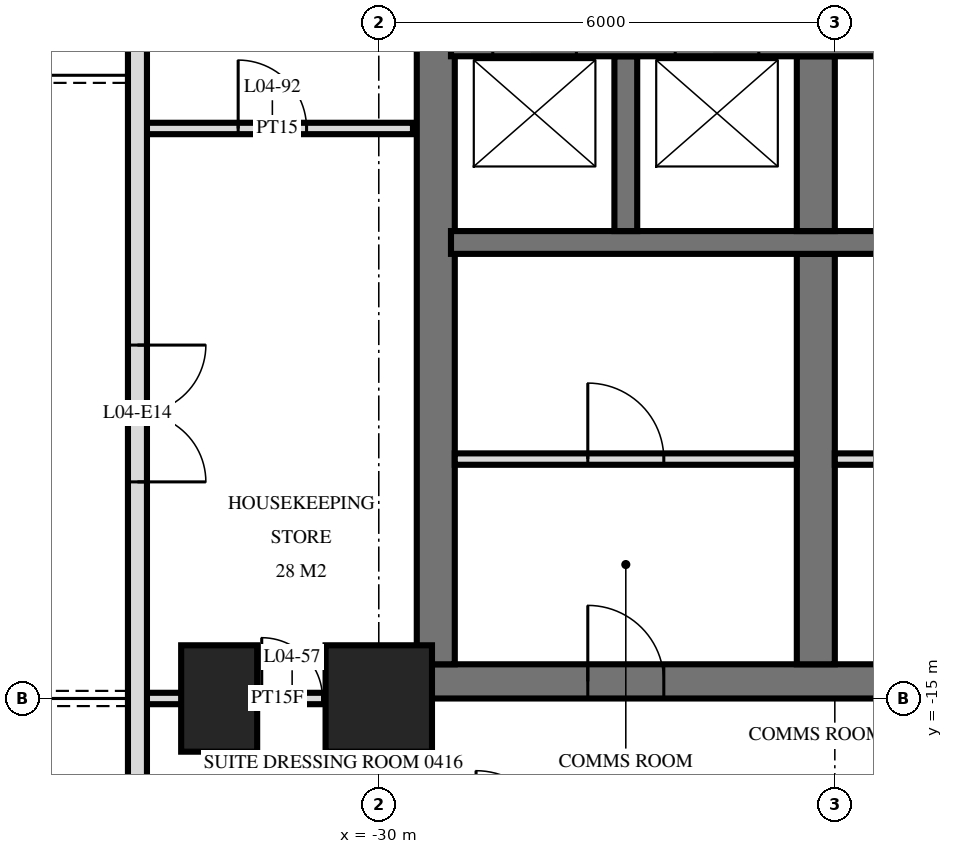
"""IFC4 building model, lengths in metres.
Left out: names, types, materials, properties, quantities, classifications, styles, units other than length and angle.
Written with IfcOpenShell. Run it as: python <this file> out.ifc"""

import sys

from ifc_helpers import new_model, si_unit, direction, frame, frame_2d, origin, origin_2d, place, context, subcontext, project, spatial, rectangle, extrude, element, fill, save


model = new_model("IFC4")
c1 = context("Model", 3, precision=1e-05, world=origin(), true_north=direction((0.0, 1.0)))
c2 = subcontext(c1, "Body", "Model", "MODEL_VIEW")
j1 = project(units=[si_unit("LENGTHUNIT", "METRE"), si_unit("PLANEANGLEUNIT", "RADIAN")], contexts=[c1])
p1 = place(None, origin())
s1 = spatial("IfcSite", under=j1, at=p1, CompositionType="ELEMENT")
p2 = place(p1, origin())
s2 = spatial("IfcBuilding", under=s1, at=p2, CompositionType="ELEMENT")
p3 = place(p2, frame((0.0, 0.0, 24.0)))
s3 = spatial("IfcBuildingStorey", under=s2, at=p3, CompositionType="ELEMENT", Elevation=24.0)
p4 = place(p3, frame((-32.1, -15.0, -0.28), z_axis=(0.0, 0.0, 1.0), x_axis=(0.0, 1.0, 0.0)))
e1 = element("IfcColumn", 1, at=p4, inside=s3, PredefinedType="COLUMN", context=c2, shape_type="SweptSolid", body=[
    extrude(rectangle(XDim=1.4, YDim=1.0, at=origin_2d()), origin(), (0.0, 0.0, 1.0), 3.88),
])
p5 = place(p3, frame((-30.0, -15.0, -0.28), z_axis=(0.0, 0.0, 1.0), x_axis=(1.0, 0.0, 0.0)))
e2 = element("IfcColumn", 2, at=p5, inside=s3, PredefinedType="COLUMN", context=c2, shape_type="SweptSolid", body=[
    extrude(rectangle(XDim=1.4, YDim=1.4, at=origin_2d()), origin(), (0.0, 0.0, 1.0), 3.88),
])
p6 = place(p3, frame((-29.5, -14.775, 0.0), z_axis=(0.0, 0.0, 1.0), x_axis=(1.0, 0.0, 0.0)))
e3 = element("IfcWall", 3, at=p6, inside=s3, PredefinedType="SHEAR", context=c2, shape_type="SweptSolid", body=[
    extrude(rectangle(XDim=19.5, YDim=0.45, at=frame_2d((9.75, 0.0))), origin(), (0.0, 0.0, 1.0), 3.6),
])
p7 = place(p6, frame((11.2, 0.0, 0.0)))
e4 = element("IfcOpeningElement", 4, at=p7, cuts=e3, PredefinedType="OPENING", context=c2, shape_type="SweptSolid", body=[
    extrude(rectangle(XDim=1.2, YDim=2.1, at=frame_2d((0.6, 1.05))), frame((0.0, 0.235, 0.0), z_axis=(0.0, -1.0, 0.0), x_axis=(1.0, 0.0, 0.0)), (0.0, 0.0, 1.0), 0.47),
])
p8 = place(p6, frame((14.25, 0.0, 0.0)))
e5 = element("IfcOpeningElement", 5, at=p8, cuts=e3, PredefinedType="OPENING", context=c2, shape_type="SweptSolid", body=[
    extrude(rectangle(XDim=1.1, YDim=2.1, at=frame_2d((0.55, 1.05))), frame((0.0, 0.235, 0.0), z_axis=(0.0, -1.0, 0.0), x_axis=(1.0, 0.0, 0.0)), (0.0, 0.0, 1.0), 0.47),
])
p9 = place(p6, frame((8.5, 0.0, 0.0)))
e6 = element("IfcOpeningElement", 6, at=p9, cuts=e3, PredefinedType="OPENING", context=c2, shape_type="SweptSolid", body=[
    extrude(rectangle(XDim=0.9, YDim=2.1, at=frame_2d((0.45, 1.05))), frame((0.0, 0.235, 0.0), z_axis=(0.0, -1.0, 0.0), x_axis=(1.0, 0.0, 0.0)), (0.0, 0.0, 1.0), 0.47),
])
p10 = place(p6, frame((6.05, 0.0, 0.0)))
e7 = element("IfcOpeningElement", 7, at=p10, cuts=e3, PredefinedType="OPENING", context=c2, shape_type="SweptSolid", body=[
    extrude(rectangle(XDim=1.0, YDim=2.1, at=frame_2d((0.5, 1.05))), frame((0.0, 0.235, 0.0), z_axis=(0.0, -1.0, 0.0), x_axis=(1.0, 0.0, 0.0)), (0.0, 0.0, 1.0), 0.47),
])
p11 = place(p6, frame((2.25, 0.0, 0.0)))
e8 = element("IfcOpeningElement", 8, at=p11, cuts=e3, PredefinedType="OPENING", context=c2, shape_type="SweptSolid", body=[
    extrude(rectangle(XDim=1.0, YDim=2.1, at=frame_2d((0.5, 1.05))), frame((0.0, 0.235, 0.0), z_axis=(0.0, -1.0, 0.0), x_axis=(1.0, 0.0, 0.0)), (0.0, 0.0, 1.0), 0.47),
])
p12 = place(p3, frame((-29.25, -14.55, 0.0), z_axis=(0.0, 0.0, 1.0), x_axis=(0.0, 1.0, 0.0)))
e9 = element("IfcWall", 9, at=p12, inside=s3, PredefinedType="SHEAR", context=c2, shape_type="SweptSolid", body=[
    extrude(rectangle(XDim=14.1, YDim=0.5, at=frame_2d((7.05, 0.0))), origin(), (0.0, 0.0, 1.0), 3.6),
])
p13 = place(p3, frame((-29.05, -6.4, 0.0), z_axis=(0.0, 0.0, 1.0), x_axis=(1.0, 0.0, 0.0)))
e10 = element("IfcWall", 10, at=p13, inside=s3, PredefinedType="SHEAR", context=c2, shape_type="SweptSolid", body=[
    extrude(rectangle(XDim=18.7, YDim=0.3, at=frame_2d((9.35, 0.0))), origin(), (0.0, 0.0, 1.0), 3.6),
])
p14 = place(p13, frame((2.95, 0.0, 0.0)))
e11 = element("IfcOpeningElement", 11, at=p14, cuts=e10, PredefinedType="OPENING", context=c2, shape_type="SweptSolid", body=[
    extrude(rectangle(XDim=1.1, YDim=2.1, at=frame_2d((0.55, 1.05))), frame((0.0, 0.16, 0.0), z_axis=(0.0, -1.0, 0.0), x_axis=(1.0, 0.0, 0.0)), (0.0, 0.0, 1.0), 0.32),
])
p15 = place(p13, frame((0.55, 0.0, 0.0)))
e12 = element("IfcOpeningElement", 12, at=p15, cuts=e10, PredefinedType="OPENING", context=c2, shape_type="SweptSolid", body=[
    extrude(rectangle(XDim=1.1, YDim=2.1, at=frame_2d((0.55, 1.05))), frame((0.0, 0.16, 0.0), z_axis=(0.0, -1.0, 0.0), x_axis=(1.0, 0.0, 0.0)), (0.0, 0.0, 1.0), 0.32),
])
p16 = place(p13, frame((10.8, 0.0, 0.0)))
e13 = element("IfcOpeningElement", 13, at=p16, cuts=e10, PredefinedType="OPENING", context=c2, shape_type="SweptSolid", body=[
    extrude(rectangle(XDim=1.1, YDim=2.1, at=frame_2d((0.55, 1.05))), frame((0.0, 0.16, 0.0), z_axis=(0.0, -1.0, 0.0), x_axis=(1.0, 0.0, 0.0)), (0.0, 0.0, 1.0), 0.32),
])
p17 = place(p13, frame((5.6, 0.0, 0.0)))
e14 = element("IfcOpeningElement", 14, at=p17, cuts=e10, PredefinedType="OPENING", context=c2, shape_type="SweptSolid", body=[
    extrude(rectangle(XDim=1.0, YDim=2.1, at=frame_2d((0.5, 1.05))), frame((0.0, 0.16, 0.0), z_axis=(0.0, -1.0, 0.0), x_axis=(1.0, 0.0, 0.0)), (0.0, 0.0, 1.0), 0.32),
])
p18 = place(p3, frame((-29.05, -9.0, 0.0), z_axis=(0.0, 0.0, 1.0), x_axis=(1.0, 0.0, 0.0)))
e15 = element("IfcWall", 15, at=p18, inside=s3, PredefinedType="SHEAR", context=c2, shape_type="SweptSolid", body=[
    extrude(rectangle(XDim=18.7, YDim=0.3, at=frame_2d((9.35, 0.0))), origin(), (0.0, 0.0, 1.0), 3.6),
])
p19 = place(p18, frame((13.8, 0.0, 0.0)))
e16 = element("IfcOpeningElement", 16, at=p19, cuts=e15, PredefinedType="OPENING", context=c2, shape_type="SweptSolid", body=[
    extrude(rectangle(XDim=1.1, YDim=2.1, at=frame_2d((0.55, 1.05))), frame((0.0, 0.16, 0.0), z_axis=(0.0, -1.0, 0.0), x_axis=(1.0, 0.0, 0.0)), (0.0, 0.0, 1.0), 0.32),
])
p20 = place(p3, frame((-24.25, -8.85, 0.0), z_axis=(0.0, 0.0, 1.0), x_axis=(0.0, 1.0, 0.0)))
e17 = element("IfcWall", 17, at=p20, inside=s3, PredefinedType="SHEAR", context=c2, shape_type="SweptSolid", body=[
    extrude(rectangle(XDim=2.3, YDim=0.5, at=frame_2d((1.15, 0.0))), origin(), (0.0, 0.0, 1.0), 3.6),
])
p21 = place(p3, frame((-24.25, -14.55, 0.0), z_axis=(0.0, 0.0, 1.0), x_axis=(0.0, 1.0, 0.0)))
e18 = element("IfcWall", 18, at=p21, inside=s3, PredefinedType="SHEAR", context=c2, shape_type="SweptSolid", body=[
    extrude(rectangle(XDim=5.4, YDim=0.5, at=frame_2d((2.7, 0.0))), origin(), (0.0, 0.0, 1.0), 3.6),
])
p22 = place(p3, frame((-26.75, -8.85, 0.0), z_axis=(0.0, 0.0, 1.0), x_axis=(0.0, 1.0, 0.0)))
e19 = element("IfcWall", 19, at=p22, inside=s3, PredefinedType="SHEAR", context=c2, shape_type="SweptSolid", body=[
    extrude(rectangle(XDim=2.3, YDim=0.3, at=frame_2d((1.15, 0.0))), origin(), (0.0, 0.0, 1.0), 3.6),
])
p23 = place(p3, frame((-33.175, -3.325, 0.0), z_axis=(0.0, 0.0, 1.0), x_axis=(0.0, -1.0, 0.0)))
e20 = element("IfcWall", 20, at=p23, inside=s3, PredefinedType="SOLIDWALL", context=c2, shape_type="SweptSolid", body=[
    extrude(rectangle(XDim=21.551, YDim=0.25, at=frame_2d((10.775, 0.0))), origin(), (0.0, 0.0, 1.0), 3.32),
])
p24 = place(p23, frame((7.025, 0.0, 0.0)))
e21 = element("IfcOpeningElement", 21, at=p24, cuts=e20, PredefinedType="OPENING", context=c2, shape_type="SweptSolid", body=[
    extrude(rectangle(XDim=1.8, YDim=2.4, at=frame_2d((0.9, 1.2))), frame((0.0, 0.135, 0.0), z_axis=(0.0, -1.0, 0.0), x_axis=(1.0, 0.0, 0.0)), (0.0, 0.0, 1.0), 0.27),
])
p25 = place(p23, frame((14.225, 0.0, 0.0)))
e22 = element("IfcOpeningElement", 22, at=p25, cuts=e20, PredefinedType="OPENING", context=c2, shape_type="SweptSolid", body=[
    extrude(rectangle(XDim=1.8, YDim=2.4, at=frame_2d((0.9, 1.2))), frame((0.0, 0.135, 0.0), z_axis=(0.0, -1.0, 0.0), x_axis=(1.0, 0.0, 0.0)), (0.0, 0.0, 1.0), 0.27),
])
p26 = place(p23, frame((18.875, 0.0, 0.0)))
e23 = element("IfcOpeningElement", 23, at=p26, cuts=e20, PredefinedType="OPENING", context=c2, shape_type="SweptSolid", body=[
    extrude(rectangle(XDim=1.8, YDim=2.4, at=frame_2d((0.9, 1.2))), frame((0.0, 0.135, 0.0), z_axis=(0.0, -1.0, 0.0), x_axis=(1.0, 0.0, 0.0)), (0.0, 0.0, 1.0), 0.27),
])
p27 = place(p3, frame((-24.0, -11.85, 0.0), z_axis=(0.0, 0.0, 1.0), x_axis=(1.0, 0.0, 0.0)))
e24 = element("IfcWall", 24, at=p27, inside=s3, PredefinedType="PARTITIONING", context=c2, shape_type="SweptSolid", body=[
    extrude(rectangle(XDim=2.1, YDim=0.15, at=frame_2d((1.05, 0.0))), origin(), (0.0, 0.0, 1.0), 3.3),
])
p28 = place(p27, frame((0.55, 0.0, 0.0)))
e25 = element("IfcOpeningElement", 25, at=p28, cuts=e24, PredefinedType="OPENING", context=c2, shape_type="SweptSolid", body=[
    extrude(rectangle(XDim=1.0, YDim=2.1, at=frame_2d((0.5, 1.05))), frame((0.0, 0.085, 0.0), z_axis=(0.0, -1.0, 0.0), x_axis=(1.0, 0.0, 0.0)), (0.0, 0.0, 1.0), 0.17),
])
p29 = place(p3, frame((-29.0, -11.85, 0.0), z_axis=(0.0, 0.0, 1.0), x_axis=(1.0, 0.0, 0.0)))
e26 = element("IfcWall", 26, at=p29, inside=s3, PredefinedType="PARTITIONING", context=c2, shape_type="SweptSolid", body=[
    extrude(rectangle(XDim=4.5, YDim=0.15, at=frame_2d((2.25, 0.0))), origin(), (0.0, 0.0, 1.0), 3.3),
])
p30 = place(p29, frame((1.75, 0.0, 0.0)))
e27 = element("IfcOpeningElement", 27, at=p30, cuts=e26, PredefinedType="OPENING", context=c2, shape_type="SweptSolid", body=[
    extrude(rectangle(XDim=1.0, YDim=2.1, at=frame_2d((0.5, 1.05))), frame((0.0, 0.085, 0.0), z_axis=(0.0, -1.0, 0.0), x_axis=(1.0, 0.0, 0.0)), (0.0, 0.0, 1.0), 0.17),
])
p31 = place(p3, frame((-33.12, -15.0, 0.0), z_axis=(0.0, 0.0, 1.0), x_axis=(1.0, 0.0, 0.0)))
e28 = element("IfcWall", 28, at=p31, inside=s3, PredefinedType="PARTITIONING", context=c2, shape_type="SweptSolid", body=[
    extrude(rectangle(XDim=3.57, YDim=0.15, at=frame_2d((1.785, 0.0))), origin(), (0.0, 0.0, 1.0), 3.32),
])
p32 = place(p31, frame((1.58, 0.0, 0.0)))
e29 = element("IfcOpeningElement", 29, at=p32, cuts=e28, PredefinedType="OPENING", context=c2, shape_type="SweptSolid", body=[
    extrude(rectangle(XDim=0.8, YDim=2.1, at=frame_2d((0.4, 1.05))), frame((0.0, 0.085, 0.0), z_axis=(0.0, -1.0, 0.0), x_axis=(1.0, 0.0, 0.0)), (0.0, 0.0, 1.0), 0.17),
])
p33 = place(p3, frame((-33.12, -7.5, 0.0), z_axis=(0.0, 0.0, 1.0), x_axis=(1.0, 0.0, 0.0)))
e30 = element("IfcWall", 30, at=p33, inside=s3, PredefinedType="PARTITIONING", context=c2, shape_type="SweptSolid", body=[
    extrude(rectangle(XDim=3.57, YDim=0.15, at=frame_2d((1.785, 0.0))), origin(), (0.0, 0.0, 1.0), 3.32),
])
p34 = place(p33, frame((1.27, 0.0, 0.0)))
e31 = element("IfcOpeningElement", 31, at=p34, cuts=e30, PredefinedType="OPENING", context=c2, shape_type="SweptSolid", body=[
    extrude(rectangle(XDim=0.9, YDim=2.1, at=frame_2d((0.45, 1.05))), frame((0.0, 0.085, 0.0), z_axis=(0.0, -1.0, 0.0), x_axis=(1.0, 0.0, 0.0)), (0.0, 0.0, 1.0), 0.17),
])
p35 = place(p24, origin())
e32 = element("IfcDoor", 32, at=p35, inside=s3, OperationType="DOUBLE_DOOR_SINGLE_SWING", PredefinedType="DOOR", context=c2, shape_type="SweptSolid", body=[
    extrude(rectangle(XDim=1.8, YDim=2.4, at=frame_2d((0.9, 1.2))), frame((0.0, 0.025, 0.0), z_axis=(0.0, -1.0, 0.0), x_axis=(1.0, 0.0, 0.0)), (0.0, 0.0, 1.0), 0.05),
])
fill(e21, e32)
p36 = place(p11, origin())
e33 = element("IfcDoor", 33, at=p36, inside=s3, OperationType="SINGLE_SWING_RIGHT", PredefinedType="DOOR", context=c2, shape_type="SweptSolid", body=[
    extrude(rectangle(XDim=1.0, YDim=2.1, at=frame_2d((0.5, 1.05))), frame((0.0, 0.025, 0.0), z_axis=(0.0, -1.0, 0.0), x_axis=(1.0, 0.0, 0.0)), (0.0, 0.0, 1.0), 0.05),
])
fill(e8, e33)
p37 = place(p30, origin())
e34 = element("IfcDoor", 34, at=p37, inside=s3, OperationType="SINGLE_SWING_RIGHT", PredefinedType="DOOR", context=c2, shape_type="SweptSolid", body=[
    extrude(rectangle(XDim=1.0, YDim=2.1, at=frame_2d((0.5, 1.05))), frame((0.0, 0.025, 0.0), z_axis=(0.0, -1.0, 0.0), x_axis=(1.0, 0.0, 0.0)), (0.0, 0.0, 1.0), 0.05),
])
fill(e27, e34)
p38 = place(p32, origin())
e35 = element("IfcDoor", 35, at=p38, inside=s3, OperationType="SINGLE_SWING_RIGHT", PredefinedType="DOOR", context=c2, shape_type="SweptSolid", body=[
    extrude(rectangle(XDim=0.8, YDim=2.1, at=frame_2d((0.4, 1.05))), frame((0.0, 0.025, 0.0), z_axis=(0.0, -1.0, 0.0), x_axis=(1.0, 0.0, 0.0)), (0.0, 0.0, 1.0), 0.05),
])
fill(e29, e35)
p39 = place(p34, origin())
e36 = element("IfcDoor", 36, at=p39, inside=s3, OperationType="SINGLE_SWING_RIGHT", PredefinedType="DOOR", context=c2, shape_type="SweptSolid", body=[
    extrude(rectangle(XDim=0.9, YDim=2.1, at=frame_2d((0.45, 1.05))), frame((0.0, 0.025, 0.0), z_axis=(0.0, -1.0, 0.0), x_axis=(1.0, 0.0, 0.0)), (0.0, 0.0, 1.0), 0.05),
])
fill(e31, e36)
save(model, sys.argv[1])
